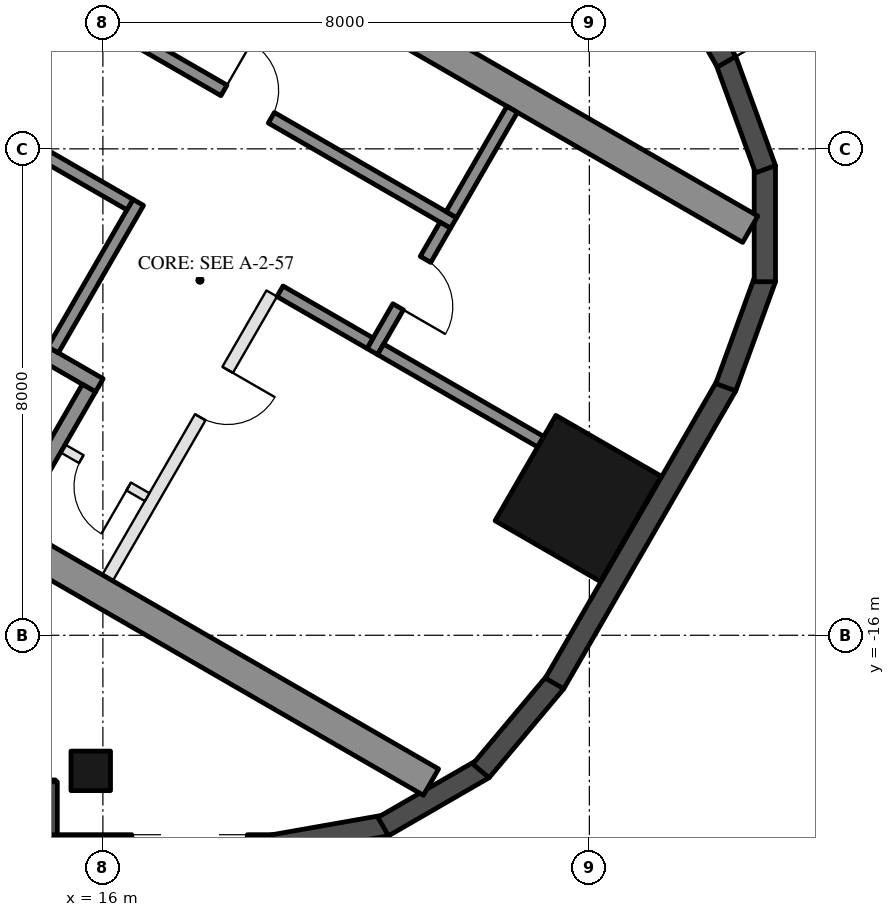
"""IFC4 building model, lengths in metres.
Left out: names, types, materials, properties, quantities, classifications, styles, units other than length and angle.
Written with IfcOpenShell. Run it as: python <this file> out.ifc"""

import sys

from ifc_helpers import new_model, si_unit, direction, frame, frame_2d, origin, origin_2d, place, context, subcontext, project, spatial, rectangle, hollow_rectangle, extrude, element, fill, save


model = new_model("IFC4")
c1 = context("Model", 3, precision=1e-05, world=origin(), true_north=direction((0.0, 1.0)))
c2 = subcontext(c1, "Body", "Model", "MODEL_VIEW")
j1 = project(units=[si_unit("LENGTHUNIT", "METRE"), si_unit("PLANEANGLEUNIT", "RADIAN")], contexts=[c1])
p1 = place(None, origin())
s1 = spatial("IfcSite", under=j1, at=p1, CompositionType="ELEMENT")
p2 = place(p1, origin())
s2 = spatial("IfcBuilding", under=s1, at=p2, CompositionType="ELEMENT")
p3 = place(p2, frame((0.0, 0.0, 246.7)))
s3 = spatial("IfcBuildingStorey", under=s2, at=p3, CompositionType="ELEMENT", Elevation=246.7)
p4 = place(p3, frame((15.8, -18.23, 0.0), z_axis=(0.0, 0.0, 1.0), x_axis=(-1.0, 0.0, 0.0)))
e1 = element("IfcColumn", 1, at=p4, inside=s3, PredefinedType="COLUMN", context=c2, shape_type="SweptSolid", body=[
    extrude(hollow_rectangle(XDim=0.65, YDim=0.65, WallThickness=0.03, at=origin_2d()), origin(), (0.0, 0.0, 1.0), 3.7),
])
p5 = place(p3, frame((23.816, -13.75, 0.0), z_axis=(0.0, 0.0, 1.0), x_axis=(0.5, 0.866025403784, 0.0)))
e2 = element("IfcColumn", 2, at=p5, inside=s3, PredefinedType="COLUMN", context=c2, shape_type="SweptSolid", body=[
    extrude(hollow_rectangle(XDim=2.0, YDim=2.0, WallThickness=0.05, at=origin_2d()), origin(), (0.0, 0.0, 1.0), 3.7),
])
p6 = place(p3, frame((8.48, -18.555, 0.0), z_axis=(0.0, 0.0, 1.0), x_axis=(1.0, 0.0, 0.0)))
e3 = element("IfcWall", 3, at=p6, inside=s3, PredefinedType="SOLIDWALL", context=c2, shape_type="SweptSolid", body=[
    extrude(rectangle(XDim=6.74, YDim=0.35, at=frame_2d((3.37, 0.0))), origin(), (0.0, 0.0, 1.0), 3.55),
])
p7 = place(p6, frame((0.32, 0.0, 0.0)))
e4 = element("IfcOpeningElement", 4, at=p7, cuts=e3, PredefinedType="OPENING", context=c2, shape_type="SweptSolid", body=[
    extrude(rectangle(XDim=2.4, YDim=2.4, at=frame_2d((1.2, 1.2))), frame((0.0, 0.185, 0.0), z_axis=(0.0, -1.0, 0.0), x_axis=(1.0, 0.0, 0.0)), (0.0, 0.0, 1.0), 0.37),
])
p8 = place(p6, frame((3.02, 0.0, 0.3)))
e5 = element("IfcOpeningElement", 5, at=p8, cuts=e3, PredefinedType="OPENING", context=c2, shape_type="SweptSolid", body=[
    extrude(rectangle(XDim=2.9, YDim=2.65, at=frame_2d((1.45, 1.325))), frame((0.0, 0.185, 0.0), z_axis=(0.0, -1.0, 0.0), x_axis=(1.0, 0.0, 0.0)), (0.0, 0.0, 1.0), 0.37),
])
p9 = place(p3, frame((15.075, -18.41, 0.0), z_axis=(0.0, 0.0, 1.0), x_axis=(0.0, -1.0, 0.0)))
e6 = element("IfcWall", 6, at=p9, inside=s3, PredefinedType="SOLIDWALL", context=c2, shape_type="SweptSolid", body=[
    extrude(rectangle(XDim=1.22, YDim=0.35, at=frame_2d((0.61, 0.0))), origin(), (0.0, 0.0, 1.0), 3.55),
])
p10 = place(p3, frame((14.9, -19.455, 0.0), z_axis=(0.0, 0.0, 1.0), x_axis=(1.0, 0.0, 0.0)))
e7 = element("IfcWall", 7, at=p10, inside=s3, PredefinedType="SOLIDWALL", context=c2, shape_type="SweptSolid", body=[
    extrude(rectangle(XDim=3.916, YDim=0.35, at=frame_2d((1.958, 0.0))), origin(), (0.0, 0.0, 1.0), 3.55),
])
p11 = place(p10, frame((1.575, 0.0, 0.3)))
e8 = element("IfcOpeningElement", 8, at=p11, cuts=e7, PredefinedType="OPENING", context=c2, shape_type="SweptSolid", body=[
    extrude(rectangle(XDim=1.9, YDim=2.65, at=frame_2d((0.95, 1.325))), frame((0.0, 0.185, 0.0), z_axis=(0.0, -1.0, 0.0), x_axis=(1.0, 0.0, 0.0)), (0.0, 0.0, 1.0), 0.37),
])
p12 = place(p3, frame((18.785, -19.458, 0.0), z_axis=(0.0, 0.0, 1.0), x_axis=(0.984798995425, 0.173697837091, 0.0)))
e9 = element("IfcWall", 9, at=p12, inside=s3, PredefinedType="SOLIDWALL", context=c2, shape_type="SweptSolid", body=[
    extrude(rectangle(XDim=1.91, YDim=0.35, at=frame_2d((0.955, 0.0))), origin(), (0.0, 0.0, 1.0), 3.55),
])
for number, where, z_axis, x_axis in (
    (10, (20.61, -19.147, 0.0), (0.0, 0.0, 1.0), (0.866, 0.5, 0.0)),
    (11, (22.217, -18.231, 0.0), (0.0, 0.0, 1.0), (0.643, 0.766, 0.0)),
):
    element("IfcWall", number, at=place(p3, frame(where, z_axis=z_axis, x_axis=x_axis)), inside=s3, PredefinedType="SOLIDWALL", context=c2, shape_type="SweptSolid", body=[
        extrude(rectangle(XDim=1.91, YDim=0.35, at=frame_2d((0.955, 0.0))), origin(), (0.0, 0.0, 1.0), 3.55),
    ])
p13 = place(p3, frame((23.427, -16.792, 0.0), z_axis=(0.0, 0.0, 1.0), x_axis=(0.500018773155, 0.866014564827, 0.0)))
e12 = element("IfcWall", 12, at=p13, inside=s3, PredefinedType="SOLIDWALL", context=c2, shape_type="SweptSolid", body=[
    extrude(rectangle(XDim=5.658, YDim=0.35, at=frame_2d((2.829, 0.0))), origin(), (0.0, 0.0, 1.0), 3.55),
])
for number, where, z_axis, x_axis in (
    (13, (26.244, -11.92, 0.0), (0.0, 0.0, 1.0), (0.342, 0.94, 0.0)),
    (14, (26.886, -10.185, 0.0), (0.0, 0.0, 1.0), (0.0, 1.0, 0.0)),
    (15, (26.897, -8.335, 0.0), (0.0, 0.0, 1.0), (-0.342, 0.94, 0.0)),
):
    element("IfcWall", number, at=place(p3, frame(where, z_axis=z_axis, x_axis=x_axis)), inside=s3, PredefinedType="SOLIDWALL", context=c2, shape_type="SweptSolid", body=[
        extrude(rectangle(XDim=1.91, YDim=0.35, at=frame_2d((0.955, 0.0))), origin(), (0.0, 0.0, 1.0), 3.55),
    ])
p14 = place(p3, frame((26.257, -6.567, 0.0), z_axis=(0.0, 0.0, 1.0), x_axis=(-0.500023526245, 0.866011820475, 0.0)))
e16 = element("IfcWall", 16, at=p14, inside=s3, PredefinedType="SOLIDWALL", context=c2, shape_type="SweptSolid", body=[
    extrude(rectangle(XDim=11.816, YDim=0.35, at=frame_2d((5.908, 0.0))), origin(), (0.0, 0.0, 1.0), 3.55),
])
p15 = place(p14, frame((0.38, 0.0, 0.3)))
e17 = element("IfcOpeningElement", 17, at=p15, cuts=e16, PredefinedType="OPENING", context=c2, shape_type="SweptSolid", body=[
    extrude(rectangle(XDim=1.9, YDim=2.65, at=frame_2d((0.95, 1.325))), frame((0.0, 0.185, 0.0), z_axis=(0.0, -1.0, 0.0), x_axis=(1.0, 0.0, 0.0)), (0.0, 0.0, 1.0), 0.37),
])
p16 = place(p14, frame((7.841, 0.0, 0.0)))
e18 = element("IfcOpeningElement", 18, at=p16, cuts=e16, PredefinedType="OPENING", context=c2, shape_type="SweptSolid", body=[
    extrude(rectangle(XDim=2.4, YDim=2.4, at=frame_2d((1.2, 1.2))), frame((0.0, 0.185, 0.0), z_axis=(0.0, -1.0, 0.0), x_axis=(1.0, 0.0, 0.0)), (0.0, 0.0, 1.0), 0.37),
])
p17 = place(p14, frame((3.691, 0.0, 0.3)))
e19 = element("IfcOpeningElement", 19, at=p17, cuts=e16, PredefinedType="OPENING", context=c2, shape_type="SweptSolid", body=[
    extrude(rectangle(XDim=1.7, YDim=2.65, at=frame_2d((0.85, 1.325))), frame((0.0, 0.185, 0.0), z_axis=(0.0, -1.0, 0.0), x_axis=(1.0, 0.0, 0.0)), (0.0, 0.0, 1.0), 0.37),
])
p18 = place(p14, frame((5.691, 0.0, 0.3)))
e20 = element("IfcOpeningElement", 20, at=p18, cuts=e16, PredefinedType="OPENING", context=c2, shape_type="SweptSolid", body=[
    extrude(rectangle(XDim=1.7, YDim=2.65, at=frame_2d((0.85, 1.325))), frame((0.0, 0.185, 0.0), z_axis=(0.0, -1.0, 0.0), x_axis=(1.0, 0.0, 0.0)), (0.0, 0.0, 1.0), 0.37),
])
for number, where, z_axis, x_axis in (
    (21, (8.547, -10.997, 0.0), (0.0, 0.0, 1.0), (0.866, -0.5, 0.0)),
    (22, (13.797, -1.903, 0.0), (0.0, 0.0, 1.0), (0.866, -0.5, 0.0)),
):
    element("IfcWall", number, at=place(p3, frame(where, z_axis=z_axis, x_axis=x_axis)), inside=s3, PredefinedType="SHEAR", context=c2, shape_type="SweptSolid", body=[
        extrude(rectangle(XDim=14.837, YDim=0.5, at=frame_2d((7.418, 0.0))), origin(), (0.0, 0.0, 1.0), 3.5),
    ])
p19 = place(p3, frame((10.356, -8.664, 0.0), z_axis=(0.0, 0.0, 1.0), x_axis=(0.866028629588, -0.499994412703, 0.0)))
e23 = element("IfcWall", 23, at=p19, inside=s3, PredefinedType="SHEAR", context=c2, shape_type="SweptSolid", body=[
    extrude(rectangle(XDim=6.45, YDim=0.25, at=frame_2d((3.225, 0.0))), origin(), (0.0, 0.0, 1.0), 3.5),
])
p20 = place(p19, frame((0.3, 0.0, 0.0)))
e24 = element("IfcOpeningElement", 24, at=p20, cuts=e23, PredefinedType="OPENING", context=c2, shape_type="SweptSolid", body=[
    extrude(rectangle(XDim=1.0, YDim=2.1, at=frame_2d((0.5, 1.05))), frame((0.0, 0.135, 0.0), z_axis=(0.0, -1.0, 0.0), x_axis=(1.0, 0.0, 0.0)), (0.0, 0.0, 1.0), 0.27),
])
p21 = place(p3, frame((14.496, -14.143, 0.0), z_axis=(0.0, 0.0, 1.0), x_axis=(0.500062241894, 0.865989465428, 0.0)))
e25 = element("IfcWall", 25, at=p21, inside=s3, PredefinedType="SHEAR", context=c2, shape_type="SweptSolid", body=[
    extrude(rectangle(XDim=2.55, YDim=0.25, at=frame_2d((1.275, 0.0))), origin(), (0.0, 0.0, 1.0), 3.5),
])
p22 = place(p3, frame((15.181, -11.305, 0.0), z_axis=(0.0, 0.0, 1.0), x_axis=(0.49994636267, 0.866056369097, 0.0)))
e26 = element("IfcWall", 26, at=p22, inside=s3, PredefinedType="SHEAR", context=c2, shape_type="SweptSolid", body=[
    extrude(rectangle(XDim=2.8, YDim=0.2, at=frame_2d((1.4, 0.0))), origin(), (0.0, 0.0, 1.0), 3.5),
])
p23 = place(p3, frame((14.02, -7.517, 0.0), z_axis=(0.0, 0.0, 1.0), x_axis=(0.866034573852, -0.49998411664, 0.0)))
e27 = element("IfcWall", 27, at=p23, inside=s3, PredefinedType="SHEAR", context=c2, shape_type="SweptSolid", body=[
    extrude(rectangle(XDim=2.8, YDim=0.2, at=frame_2d((1.4, 0.0))), origin(), (0.0, 0.0, 1.0), 3.5),
])
p24 = place(p3, frame((12.968, -4.138, 0.0), z_axis=(0.0, 0.0, 1.0), x_axis=(0.866028328073, -0.49999493495, 0.0)))
e28 = element("IfcWall", 28, at=p24, inside=s3, PredefinedType="SHEAR", context=c2, shape_type="SweptSolid", body=[
    extrude(rectangle(XDim=10.16, YDim=0.2, at=frame_2d((5.08, 0.0))), origin(), (0.0, 0.0, 1.0), 3.5),
])
p25 = place(p24, frame((0.62, 0.0, 0.0)))
e29 = element("IfcOpeningElement", 29, at=p25, cuts=e28, PredefinedType="OPENING", context=c2, shape_type="SweptSolid", body=[
    extrude(rectangle(XDim=1.1, YDim=2.1, at=frame_2d((0.55, 1.05))), frame((0.0, 0.11, 0.0), z_axis=(0.0, -1.0, 0.0), x_axis=(1.0, 0.0, 0.0)), (0.0, 0.0, 1.0), 0.22),
])
p26 = place(p24, frame((5.8, 0.0, 0.0)))
e30 = element("IfcOpeningElement", 30, at=p26, cuts=e28, PredefinedType="OPENING", context=c2, shape_type="SweptSolid", body=[
    extrude(rectangle(XDim=0.9, YDim=2.1, at=frame_2d((0.45, 1.05))), frame((0.0, 0.11, 0.0), z_axis=(0.0, -1.0, 0.0), x_axis=(1.0, 0.0, 0.0)), (0.0, 0.0, 1.0), 0.22),
])
p27 = place(p3, frame((20.43, -11.333, 0.0), z_axis=(0.0, 0.0, 1.0), x_axis=(0.500001309137, 0.866024647952, 0.0)))
e31 = element("IfcWall", 31, at=p27, inside=s3, PredefinedType="SHEAR", context=c2, shape_type="SweptSolid", body=[
    extrude(rectangle(XDim=2.4, YDim=0.2, at=frame_2d((1.2, 0.0))), origin(), (0.0, 0.0, 1.0), 3.5),
])
p28 = place(p27, frame((0.85, 0.0, 0.0)))
e32 = element("IfcOpeningElement", 32, at=p28, cuts=e31, PredefinedType="OPENING", context=c2, shape_type="SweptSolid", body=[
    extrude(rectangle(XDim=0.9, YDim=2.1, at=frame_2d((0.45, 1.05))), frame((0.0, 0.11, 0.0), z_axis=(0.0, -1.0, 0.0), x_axis=(1.0, 0.0, 0.0)), (0.0, 0.0, 1.0), 0.22),
])
p29 = place(p3, frame((18.913, -10.342, 0.0), z_axis=(0.0, 0.0, 1.0), x_axis=(0.866038183914, -0.499977863513, 0.0)))
e33 = element("IfcWall", 33, at=p29, inside=s3, PredefinedType="SHEAR", context=c2, shape_type="SweptSolid", body=[
    extrude(rectangle(XDim=1.71, YDim=0.2, at=frame_2d((0.855, 0.0))), origin(), (0.0, 0.0, 1.0), 3.5),
])
p30 = place(p3, frame((21.73, -9.082, 0.0), z_axis=(0.0, 0.0, 1.0), x_axis=(0.50002537861, 0.866010750942, 0.0)))
e34 = element("IfcWall", 34, at=p30, inside=s3, PredefinedType="SHEAR", context=c2, shape_type="SweptSolid", body=[
    extrude(rectangle(XDim=2.0, YDim=0.2, at=frame_2d((1.0, 0.0))), origin(), (0.0, 0.0, 1.0), 3.5),
])
p31 = place(p3, frame((20.567, -11.297, 0.0), z_axis=(0.0, 0.0, 1.0), x_axis=(0.866065229334, -0.49993101378, 0.0)))
e35 = element("IfcWall", 35, at=p31, inside=s3, PredefinedType="SHEAR", context=c2, shape_type="SweptSolid", body=[
    extrude(rectangle(XDim=3.04, YDim=0.2, at=frame_2d((1.52, 0.0))), origin(), (0.0, 0.0, 1.0), 3.5),
])
p32 = place(p3, frame((16.076, -15.055, 0.0), z_axis=(0.0, 0.0, 1.0), x_axis=(0.499995103361, 0.866028230842, 0.0)))
e36 = element("IfcWall", 36, at=p32, inside=s3, PredefinedType="PARTITIONING", context=c2, shape_type="SweptSolid", body=[
    extrude(rectangle(XDim=5.4, YDim=0.2, at=frame_2d((2.7, 0.0))), origin(), (0.0, 0.0, 1.0), 3.5),
])
p33 = place(p32, frame((3.05, 0.0, 0.0)))
e37 = element("IfcOpeningElement", 37, at=p33, cuts=e36, PredefinedType="OPENING", context=c2, shape_type="SweptSolid", body=[
    extrude(rectangle(XDim=0.9, YDim=2.1, at=frame_2d((0.45, 1.05))), frame((0.0, 0.11, 0.0), z_axis=(0.0, -1.0, 0.0), x_axis=(1.0, 0.0, 0.0)), (0.0, 0.0, 1.0), 0.22),
])
p34 = place(p3, frame((15.342, -12.928, 0.0), z_axis=(0.0, 0.0, 1.0), x_axis=(0.865989903783, -0.500061482766, 0.0)))
e38 = element("IfcWall", 38, at=p34, inside=s3, PredefinedType="PARTITIONING", context=c2, shape_type="SweptSolid", body=[
    extrude(rectangle(XDim=1.6, YDim=0.15, at=frame_2d((0.8, 0.0))), origin(), (0.0, 0.0, 1.0), 3.5),
])
p35 = place(p34, frame((0.35, 0.0, 0.0)))
e39 = element("IfcOpeningElement", 39, at=p35, cuts=e38, PredefinedType="OPENING", context=c2, shape_type="SweptSolid", body=[
    extrude(rectangle(XDim=0.9, YDim=2.1, at=frame_2d((0.45, 1.05))), frame((0.0, 0.085, 0.0), z_axis=(0.0, -1.0, 0.0), x_axis=(1.0, 0.0, 0.0)), (0.0, 0.0, 1.0), 0.17),
])
p36 = place(p35, frame((0.9, 0.0, 0.0), z_axis=(0.0, 0.0, 1.0), x_axis=(-1.0, 0.0, 0.0)))
e40 = element("IfcDoor", 40, at=p36, inside=s3, OperationType="SINGLE_SWING_LEFT", PredefinedType="DOOR", context=c2, shape_type="SweptSolid", body=[
    extrude(rectangle(XDim=0.9, YDim=2.1, at=frame_2d((0.45, 1.05))), frame((0.0, 0.025, 0.0), z_axis=(0.0, -1.0, 0.0), x_axis=(1.0, 0.0, 0.0)), (0.0, 0.0, 1.0), 0.05),
])
fill(e39, e40)
p37 = place(p26, origin())
e41 = element("IfcDoor", 41, at=p37, inside=s3, OperationType="SINGLE_SWING_LEFT", PredefinedType="DOOR", context=c2, shape_type="SweptSolid", body=[
    extrude(rectangle(XDim=0.9, YDim=2.1, at=frame_2d((0.45, 1.05))), frame((0.0, 0.025, 0.0), z_axis=(0.0, -1.0, 0.0), x_axis=(1.0, 0.0, 0.0)), (0.0, 0.0, 1.0), 0.05),
])
fill(e30, e41)
p38 = place(p28, frame((0.9, 0.0, 0.0), z_axis=(0.0, 0.0, 1.0), x_axis=(-1.0, 0.0, 0.0)))
e42 = element("IfcDoor", 42, at=p38, inside=s3, OperationType="SINGLE_SWING_RIGHT", PredefinedType="DOOR", context=c2, shape_type="SweptSolid", body=[
    extrude(rectangle(XDim=0.9, YDim=2.1, at=frame_2d((0.45, 1.05))), frame((0.0, 0.025, 0.0), z_axis=(0.0, -1.0, 0.0), x_axis=(1.0, 0.0, 0.0)), (0.0, 0.0, 1.0), 0.05),
])
fill(e32, e42)
p39 = place(p33, frame((0.9, 0.0, 0.0), z_axis=(0.0, 0.0, 1.0), x_axis=(-1.0, 0.0, 0.0)))
e43 = element("IfcDoor", 43, at=p39, inside=s3, OperationType="SINGLE_SWING_LEFT", PredefinedType="DOOR", context=c2, shape_type="SweptSolid", body=[
    extrude(rectangle(XDim=0.9, YDim=2.1, at=frame_2d((0.45, 1.05))), frame((0.0, 0.025, 0.0), z_axis=(0.0, -1.0, 0.0), x_axis=(1.0, 0.0, 0.0)), (0.0, 0.0, 1.0), 0.05),
])
fill(e37, e43)
save(model, sys.argv[1])
